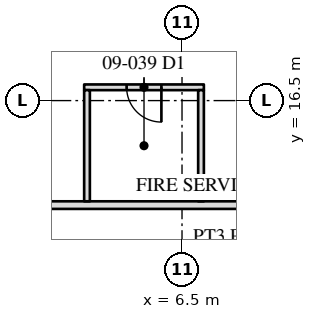
"""IFC4 building model, lengths in metres.
Left out: names, types, materials, properties, quantities, classifications, styles, units other than length and angle.
Written with IfcOpenShell. Run it as: python <this file> out.ifc"""

import sys

from ifc_helpers import new_model, si_unit, direction, frame, frame_2d, origin, place, context, subcontext, project, spatial, rectangle, extrude, element, fill, save


model = new_model("IFC4")
c1 = context("Model", 3, precision=1e-05, world=origin(), true_north=direction((0.0, 1.0)))
c2 = subcontext(c1, "Body", "Model", "MODEL_VIEW")
j1 = project(units=[si_unit("LENGTHUNIT", "METRE"), si_unit("PLANEANGLEUNIT", "RADIAN")], contexts=[c1])
p1 = place(None, origin())
s1 = spatial("IfcSite", under=j1, at=p1, CompositionType="ELEMENT")
p2 = place(p1, origin())
s2 = spatial("IfcBuilding", under=s1, at=p2, CompositionType="ELEMENT")
p3 = place(p2, frame((0.0, 0.0, 40.6)))
s3 = spatial("IfcBuildingStorey", under=s2, at=p3, CompositionType="ELEMENT", Elevation=40.6)
p4 = place(p3, frame((13.85, 13.75, 0.0), z_axis=(0.0, 0.0, 1.0), x_axis=(-1.0, 0.0, 0.0)))
e1 = element("IfcWall", 1, at=p4, inside=s3, PredefinedType="PARTITIONING", context=c2, shape_type="SweptSolid", body=[
    extrude(rectangle(XDim=27.5, YDim=0.2, at=frame_2d((13.75, 0.0))), origin(), (0.0, 0.0, 1.0), 3.91),
])
p5 = place(p3, frame((7.075, 16.85, 0.0), z_axis=(0.0, 0.0, 1.0), x_axis=(-1.0, 0.0, 0.0)))
e2 = element("IfcWall", 2, at=p5, inside=s3, PredefinedType="PARTITIONING", context=c2, shape_type="SweptSolid", body=[
    extrude(rectangle(XDim=3.15, YDim=0.15, at=frame_2d((1.575, 0.0))), origin(), (0.0, 0.0, 1.0), 3.91),
])
p6 = place(p5, frame((1.117, 0.0, 0.0)))
e3 = element("IfcOpeningElement", 3, at=p6, cuts=e2, PredefinedType="OPENING", context=c2, shape_type="SweptSolid", body=[
    extrude(rectangle(XDim=0.915, YDim=2.134, at=frame_2d((0.458, 1.067))), frame((0.0, 0.085, 0.0), z_axis=(0.0, -1.0, 0.0), x_axis=(1.0, 0.0, 0.0)), (0.0, 0.0, 1.0), 0.17),
])
for number, where, z_axis, x_axis in (
    (4, (7.0, 16.775, 0.0), (0.0, 0.0, 1.0), (0.0, -1.0, 0.0)),
    (5, (4.0, 16.775, 0.0), (0.0, 0.0, 1.0), (0.0, -1.0, 0.0)),
):
    element("IfcWall", number, at=place(p3, frame(where, z_axis=z_axis, x_axis=x_axis)), inside=s3, PredefinedType="PARTITIONING", context=c2, shape_type="SweptSolid", body=[
        extrude(rectangle(XDim=2.925, YDim=0.15, at=frame_2d((1.462, 0.0))), origin(), (0.0, 0.0, 1.0), 3.91),
    ])
p7 = place(p6, origin())
e6 = element("IfcDoor", 6, at=p7, inside=s3, OperationType="SINGLE_SWING_LEFT", PredefinedType="DOOR", context=c2, shape_type="SweptSolid", body=[
    extrude(rectangle(XDim=0.915, YDim=2.134, at=frame_2d((0.458, 1.067))), frame((0.0, 0.025, 0.0), z_axis=(0.0, -1.0, 0.0), x_axis=(1.0, 0.0, 0.0)), (0.0, 0.0, 1.0), 0.05),
])
fill(e3, e6)
save(model, sys.argv[1])
